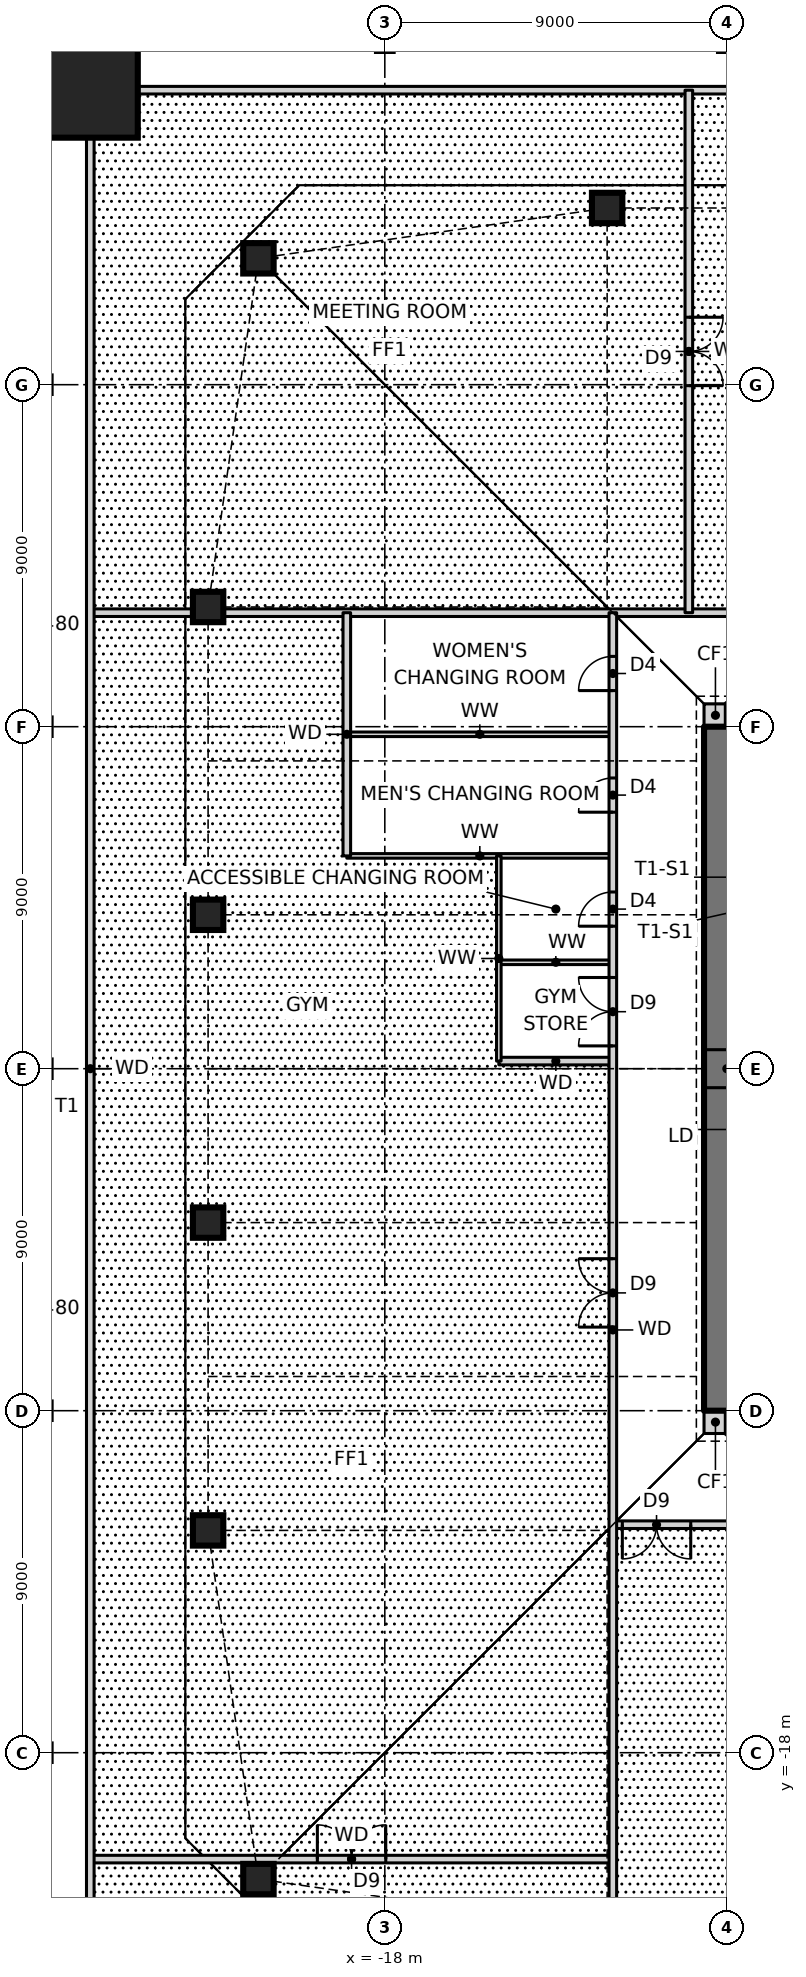
"""IFC4 building model, lengths in metres.
Left out: names, types, materials, properties, quantities, classifications, styles, units other than length and angle.
Written with IfcOpenShell. Run it as: python <this file> out.ifc"""

import sys

from ifc_helpers import new_model, si_unit, direction, frame, frame_2d, origin, origin_2d, place, context, subcontext, project, spatial, rectangle, hollow_rectangle, i_section, extrude, element, fill, save


model = new_model("IFC4")
c1 = context("Model", 3, precision=1e-05, world=origin(), true_north=direction((0.0, 1.0)))
c2 = subcontext(c1, "Body", "Model", "MODEL_VIEW")
j1 = project(units=[si_unit("LENGTHUNIT", "METRE"), si_unit("PLANEANGLEUNIT", "RADIAN")], contexts=[c1])
p1 = place(None, origin())
s1 = spatial("IfcSite", under=j1, at=p1, CompositionType="ELEMENT")
p2 = place(p1, origin())
s2 = spatial("IfcBuilding", under=s1, at=p2, CompositionType="ELEMENT")
p3 = place(p2, frame((0.0, 0.0, 6.0)))
s3 = spatial("IfcBuildingStorey", under=s2, at=p3, CompositionType="ELEMENT", Elevation=6.0)
for number, where, z_axis, x_axis in (
    (1, (-21.326, -21.326, 0.0), (0.0, 0.0, 1.0), (1.0, 0.0, 0.0)),
    (2, (-12.15, 22.65, 0.0), (0.0, 0.0, 1.0), (1.0, 0.0, 0.0)),
    (3, (-21.326, 21.326, 0.0), (0.0, 0.0, 1.0), (1.0, 0.0, 0.0)),
    (4, (-22.65, 12.15, 0.0), (0.0, 0.0, 1.0), (1.0, 0.0, 0.0)),
    (5, (-22.65, 4.05, 0.0), (0.0, 0.0, 1.0), (1.0, 0.0, 0.0)),
    (6, (-22.65, -4.05, 0.0), (0.0, 0.0, 1.0), (1.0, 0.0, 0.0)),
    (7, (-22.65, -12.15, 0.0), (0.0, 0.0, 1.0), (1.0, 0.0, 0.0)),
):
    element("IfcColumn", number, at=place(p3, frame(where, z_axis=z_axis, x_axis=x_axis)), inside=s3, PredefinedType="COLUMN", context=c2, shape_type="SweptSolid", body=[
        extrude(hollow_rectangle(XDim=0.8, YDim=0.8, WallThickness=0.09, at=origin_2d()), origin(), (0.0, 0.0, 1.0), 4.5),
    ])
p4 = place(p3, frame((-27.0, 27.0, 0.0), z_axis=(0.0, 0.0, 1.0), x_axis=(1.0, 0.0, 0.0)))
e8 = element("IfcColumn", 8, at=p4, inside=s3, PredefinedType="COLUMN", context=c2, shape_type="SweptSolid", body=[
    extrude(rectangle(XDim=5.0, YDim=5.0, at=origin_2d()), origin(), (0.0, 0.0, 1.0), 4.5),
    extrude(i_section(OverallWidth=0.478, OverallDepth=0.599, WebThickness=0.1, FlangeThickness=0.14, at=origin_2d()), origin(), (0.0, 0.0, 1.0), 4.5),
])
for number, where, z_axis, x_axis in (
    (9, (-9.6, -9.3, 0.0), (0.0, 0.0, 1.0), (1.0, 0.0, 0.0)),
    (10, (-9.6, 9.3, 0.0), (0.0, 0.0, 1.0), (1.0, 0.0, 0.0)),
):
    element("IfcWall", number, at=place(p3, frame(where, z_axis=z_axis, x_axis=x_axis)), inside=s3, PredefinedType="SOLIDWALL", context=c2, shape_type="SweptSolid", body=[
        extrude(rectangle(XDim=0.6, YDim=0.6, at=frame_2d((0.3, 0.0))), origin(), (0.0, 0.0, 1.0), 4.5),
    ])
p5 = place(p3, frame((-9.0, 9.0, 0.0), z_axis=(0.0, 0.0, 1.0), x_axis=(0.0, -1.0, 0.0)))
e11 = element("IfcWall", 11, at=p5, inside=s3, PredefinedType="SHEAR", context=c2, shape_type="SweptSolid", body=[
    extrude(rectangle(XDim=18.0, YDim=1.2, at=frame_2d((9.0, 0.0))), origin(), (0.0, 0.0, 1.0), 4.5),
])
p6 = place(p5, frame((8.5, 0.0, 0.0)))
e12 = element("IfcOpeningElement", 12, at=p6, cuts=e11, PredefinedType="OPENING", context=c2, shape_type="SweptSolid", body=[
    extrude(rectangle(XDim=1.0, YDim=2.1, at=frame_2d((0.5, 1.05))), frame((0.0, 0.61, 0.0), z_axis=(0.0, -1.0, 0.0), x_axis=(1.0, 0.0, 0.0)), (0.0, 0.0, 1.0), 1.22),
])
p7 = place(p3, frame((-25.75, -20.8, 0.0), z_axis=(0.0, 0.0, 1.0), x_axis=(1.0, 0.0, 0.0)))
e13 = element("IfcWall", 13, at=p7, inside=s3, PredefinedType="SOLIDWALL", context=c2, shape_type="SweptSolid", body=[
    extrude(rectangle(XDim=13.75, YDim=0.2, at=frame_2d((6.875, 0.0))), origin(), (0.0, 0.0, 1.0), 4.25),
])
p8 = place(p7, frame((5.975, 0.0, 0.0)))
e14 = element("IfcOpeningElement", 14, at=p8, cuts=e13, PredefinedType="OPENING", context=c2, shape_type="SweptSolid", body=[
    extrude(rectangle(XDim=1.8, YDim=2.1, at=frame_2d((0.9, 1.05))), frame((0.0, 0.11, 0.0), z_axis=(0.0, -1.0, 0.0), x_axis=(1.0, 0.0, 0.0)), (0.0, 0.0, 1.0), 0.22),
])
p9 = place(p3, frame((-12.0, -12.0, 0.0), z_axis=(0.0, 0.0, 1.0), x_axis=(1.0, 0.0, 0.0)))
e15 = element("IfcWall", 15, at=p9, inside=s3, PredefinedType="SOLIDWALL", context=c2, shape_type="SweptSolid", body=[
    extrude(rectangle(XDim=37.75, YDim=0.2, at=frame_2d((18.875, 0.0))), origin(), (0.0, 0.0, 1.0), 4.25),
])
p10 = place(p9, frame((10.1, 0.0, 0.0)))
e16 = element("IfcOpeningElement", 16, at=p10, cuts=e15, PredefinedType="OPENING", context=c2, shape_type="SweptSolid", body=[
    extrude(rectangle(XDim=1.8, YDim=2.1, at=frame_2d((0.9, 1.05))), frame((0.0, 0.11, 0.0), z_axis=(0.0, -1.0, 0.0), x_axis=(1.0, 0.0, 0.0)), (0.0, 0.0, 1.0), 0.22),
])
p11 = place(p9, frame((0.25, 0.0, 0.0)))
e17 = element("IfcOpeningElement", 17, at=p11, cuts=e15, PredefinedType="OPENING", context=c2, shape_type="SweptSolid", body=[
    extrude(rectangle(XDim=1.8, YDim=2.1, at=frame_2d((0.9, 1.05))), frame((0.0, 0.11, 0.0), z_axis=(0.0, -1.0, 0.0), x_axis=(1.0, 0.0, 0.0)), (0.0, 0.0, 1.0), 0.22),
])
p12 = place(p3, frame((-15.0, 0.2, 0.0), z_axis=(0.0, 0.0, 1.0), x_axis=(1.0, 0.0, 0.0)))
e18 = element("IfcWall", 18, at=p12, inside=s3, PredefinedType="SOLIDWALL", context=c2, shape_type="SweptSolid", body=[
    extrude(rectangle(XDim=3.0, YDim=0.2, at=frame_2d((1.5, 0.0))), origin(), (0.0, 0.0, 1.0), 4.25),
])
p13 = place(p3, frame((-15.0, 2.8, 0.0), z_axis=(0.0, 0.0, 1.0), x_axis=(1.0, 0.0, 0.0)))
e19 = element("IfcWall", 19, at=p13, inside=s3, PredefinedType="PARTITIONING", context=c2, shape_type="SweptSolid", body=[
    extrude(rectangle(XDim=3.0, YDim=0.12, at=frame_2d((1.5, 0.0))), origin(), (0.0, 0.0, 1.0), 4.25),
])
for number, where, z_axis, x_axis in (
    (20, (-19.0, 5.6, 0.0), (0.0, 0.0, 1.0), (1.0, 0.0, 0.0)),
    (21, (-19.0, 8.8, 0.0), (0.0, 0.0, 1.0), (1.0, 0.0, 0.0)),
):
    element("IfcWall", number, at=place(p3, frame(where, z_axis=z_axis, x_axis=x_axis)), inside=s3, PredefinedType="PARTITIONING", context=c2, shape_type="SweptSolid", body=[
        extrude(rectangle(XDim=7.0, YDim=0.12, at=frame_2d((3.5, 0.0))), origin(), (0.0, 0.0, 1.0), 4.25),
    ])
p14 = place(p3, frame((-25.75, 12.0, 0.0), z_axis=(0.0, 0.0, 1.0), x_axis=(1.0, 0.0, 0.0)))
e22 = element("IfcWall", 22, at=p14, inside=s3, PredefinedType="SOLIDWALL", context=c2, shape_type="SweptSolid", body=[
    extrude(rectangle(XDim=37.75, YDim=0.2, at=frame_2d((18.875, 0.0))), origin(), (0.0, 0.0, 1.0), 4.25),
])
p15 = place(p14, frame((25.85, 0.0, 0.0)))
e23 = element("IfcOpeningElement", 23, at=p15, cuts=e22, PredefinedType="OPENING", context=c2, shape_type="SweptSolid", body=[
    extrude(rectangle(XDim=1.8, YDim=2.1, at=frame_2d((0.9, 1.05))), frame((0.0, 0.11, 0.0), z_axis=(0.0, -1.0, 0.0), x_axis=(1.0, 0.0, 0.0)), (0.0, 0.0, 1.0), 0.22),
])
p16 = place(p3, frame((-25.75, 25.75, 0.0), z_axis=(0.0, 0.0, 1.0), x_axis=(1.0, 0.0, 0.0)))
e24 = element("IfcWall", 24, at=p16, inside=s3, PredefinedType="SOLIDWALL", context=c2, shape_type="SweptSolid", body=[
    extrude(rectangle(XDim=51.5, YDim=0.2, at=frame_2d((25.75, 0.0))), origin(), (0.0, 0.0, 1.0), 4.25),
])
p17 = place(p3, frame((-10.0, 12.0, 0.0), z_axis=(0.0, 0.0, 1.0), x_axis=(0.0, 1.0, 0.0)))
e25 = element("IfcWall", 25, at=p17, inside=s3, PredefinedType="SOLIDWALL", context=c2, shape_type="SweptSolid", body=[
    extrude(rectangle(XDim=13.75, YDim=0.2, at=frame_2d((6.875, 0.0))), origin(), (0.0, 0.0, 1.0), 4.25),
])
p18 = place(p17, frame((5.975, 0.0, 0.0)))
e26 = element("IfcOpeningElement", 26, at=p18, cuts=e25, PredefinedType="OPENING", context=c2, shape_type="SweptSolid", body=[
    extrude(rectangle(XDim=1.8, YDim=2.1, at=frame_2d((0.9, 1.05))), frame((0.0, 0.11, 0.0), z_axis=(0.0, -1.0, 0.0), x_axis=(1.0, 0.0, 0.0)), (0.0, 0.0, 1.0), 0.22),
])
p19 = place(p3, frame((-12.0, -25.75, 0.0), z_axis=(0.0, 0.0, 1.0), x_axis=(0.0, 1.0, 0.0)))
e27 = element("IfcWall", 27, at=p19, inside=s3, PredefinedType="SOLIDWALL", context=c2, shape_type="SweptSolid", body=[
    extrude(rectangle(XDim=37.75, YDim=0.2, at=frame_2d((18.875, 0.0))), origin(), (0.0, 0.0, 1.0), 4.25),
])
p20 = place(p19, frame((35.7, 0.0, 0.0)))
e28 = element("IfcOpeningElement", 28, at=p20, cuts=e27, PredefinedType="OPENING", context=c2, shape_type="SweptSolid", body=[
    extrude(rectangle(XDim=0.9, YDim=2.1, at=frame_2d((0.45, 1.05))), frame((0.0, 0.11, 0.0), z_axis=(0.0, -1.0, 0.0), x_axis=(1.0, 0.0, 0.0)), (0.0, 0.0, 1.0), 0.22),
])
p21 = place(p19, frame((32.5, 0.0, 0.0)))
e29 = element("IfcOpeningElement", 29, at=p21, cuts=e27, PredefinedType="OPENING", context=c2, shape_type="SweptSolid", body=[
    extrude(rectangle(XDim=0.9, YDim=2.1, at=frame_2d((0.45, 1.05))), frame((0.0, 0.11, 0.0), z_axis=(0.0, -1.0, 0.0), x_axis=(1.0, 0.0, 0.0)), (0.0, 0.0, 1.0), 0.22),
])
p22 = place(p19, frame((29.5, 0.0, 0.0)))
e30 = element("IfcOpeningElement", 30, at=p22, cuts=e27, PredefinedType="OPENING", context=c2, shape_type="SweptSolid", body=[
    extrude(rectangle(XDim=0.9, YDim=2.1, at=frame_2d((0.45, 1.05))), frame((0.0, 0.11, 0.0), z_axis=(0.0, -1.0, 0.0), x_axis=(1.0, 0.0, 0.0)), (0.0, 0.0, 1.0), 0.22),
])
p23 = place(p19, frame((26.35, 0.0, 0.0)))
e31 = element("IfcOpeningElement", 31, at=p23, cuts=e27, PredefinedType="OPENING", context=c2, shape_type="SweptSolid", body=[
    extrude(rectangle(XDim=1.8, YDim=2.1, at=frame_2d((0.9, 1.05))), frame((0.0, 0.11, 0.0), z_axis=(0.0, -1.0, 0.0), x_axis=(1.0, 0.0, 0.0)), (0.0, 0.0, 1.0), 0.22),
])
p24 = place(p19, frame((18.95, 0.0, 0.0)))
e32 = element("IfcOpeningElement", 32, at=p24, cuts=e27, PredefinedType="OPENING", context=c2, shape_type="SweptSolid", body=[
    extrude(rectangle(XDim=1.8, YDim=2.1, at=frame_2d((0.9, 1.05))), frame((0.0, 0.11, 0.0), z_axis=(0.0, -1.0, 0.0), x_axis=(1.0, 0.0, 0.0)), (0.0, 0.0, 1.0), 0.22),
])
p25 = place(p3, frame((-15.0, 0.2, 0.0), z_axis=(0.0, 0.0, 1.0), x_axis=(0.0, 1.0, 0.0)))
e33 = element("IfcWall", 33, at=p25, inside=s3, PredefinedType="PARTITIONING", context=c2, shape_type="SweptSolid", body=[
    extrude(rectangle(XDim=5.4, YDim=0.12, at=frame_2d((2.7, 0.0))), origin(), (0.0, 0.0, 1.0), 4.25),
])
p26 = place(p3, frame((-19.0, 5.6, 0.0), z_axis=(0.0, 0.0, 1.0), x_axis=(0.0, 1.0, 0.0)))
e34 = element("IfcWall", 34, at=p26, inside=s3, PredefinedType="SOLIDWALL", context=c2, shape_type="SweptSolid", body=[
    extrude(rectangle(XDim=6.4, YDim=0.2, at=frame_2d((3.2, 0.0))), origin(), (0.0, 0.0, 1.0), 4.25),
])
p27 = place(p3, frame((-25.75, -25.75, 0.0), z_axis=(0.0, 0.0, 1.0), x_axis=(0.0, 1.0, 0.0)))
e35 = element("IfcWall", 35, at=p27, inside=s3, PredefinedType="SOLIDWALL", context=c2, shape_type="SweptSolid", body=[
    extrude(rectangle(XDim=51.5, YDim=0.2, at=frame_2d((25.75, 0.0))), origin(), (0.0, 0.0, 1.0), 4.25),
])
p28 = place(p11, frame((1.8, 0.0, 0.0), z_axis=(0.0, 0.0, 1.0), x_axis=(-1.0, 0.0, 0.0)))
e36 = element("IfcDoor", 36, at=p28, inside=s3, OperationType="DOUBLE_DOOR_SINGLE_SWING", PredefinedType="DOOR", context=c2, shape_type="SweptSolid", body=[
    extrude(rectangle(XDim=1.8, YDim=2.1, at=frame_2d((0.9, 1.05))), frame((0.0, 0.025, 0.0), z_axis=(0.0, -1.0, 0.0), x_axis=(1.0, 0.0, 0.0)), (0.0, 0.0, 1.0), 0.05),
])
fill(e17, e36)
p29 = place(p18, frame((1.8, 0.0, 0.0), z_axis=(0.0, 0.0, 1.0), x_axis=(-1.0, 0.0, 0.0)))
e37 = element("IfcDoor", 37, at=p29, inside=s3, OperationType="DOUBLE_DOOR_SINGLE_SWING", PredefinedType="DOOR", context=c2, shape_type="SweptSolid", body=[
    extrude(rectangle(XDim=1.8, YDim=2.1, at=frame_2d((0.9, 1.05))), frame((0.0, 0.025, 0.0), z_axis=(0.0, -1.0, 0.0), x_axis=(1.0, 0.0, 0.0)), (0.0, 0.0, 1.0), 0.05),
])
fill(e26, e37)
p30 = place(p20, origin())
e38 = element("IfcDoor", 38, at=p30, inside=s3, OperationType="SINGLE_SWING_LEFT", PredefinedType="DOOR", context=c2, shape_type="SweptSolid", body=[
    extrude(rectangle(XDim=0.9, YDim=2.1, at=frame_2d((0.45, 1.05))), frame((0.0, 0.025, 0.0), z_axis=(0.0, -1.0, 0.0), x_axis=(1.0, 0.0, 0.0)), (0.0, 0.0, 1.0), 0.05),
])
fill(e28, e38)
p31 = place(p21, origin())
e39 = element("IfcDoor", 39, at=p31, inside=s3, OperationType="SINGLE_SWING_LEFT", PredefinedType="DOOR", context=c2, shape_type="SweptSolid", body=[
    extrude(rectangle(XDim=0.9, YDim=2.1, at=frame_2d((0.45, 1.05))), frame((0.0, 0.025, 0.0), z_axis=(0.0, -1.0, 0.0), x_axis=(1.0, 0.0, 0.0)), (0.0, 0.0, 1.0), 0.05),
])
fill(e29, e39)
p32 = place(p22, origin())
e40 = element("IfcDoor", 40, at=p32, inside=s3, OperationType="SINGLE_SWING_LEFT", PredefinedType="DOOR", context=c2, shape_type="SweptSolid", body=[
    extrude(rectangle(XDim=0.9, YDim=2.1, at=frame_2d((0.45, 1.05))), frame((0.0, 0.025, 0.0), z_axis=(0.0, -1.0, 0.0), x_axis=(1.0, 0.0, 0.0)), (0.0, 0.0, 1.0), 0.05),
])
fill(e30, e40)
p33 = place(p23, origin())
e41 = element("IfcDoor", 41, at=p33, inside=s3, OperationType="DOUBLE_DOOR_SINGLE_SWING", PredefinedType="DOOR", context=c2, shape_type="SweptSolid", body=[
    extrude(rectangle(XDim=1.8, YDim=2.1, at=frame_2d((0.9, 1.05))), frame((0.0, 0.025, 0.0), z_axis=(0.0, -1.0, 0.0), x_axis=(1.0, 0.0, 0.0)), (0.0, 0.0, 1.0), 0.05),
])
fill(e31, e41)
p34 = place(p24, origin())
e42 = element("IfcDoor", 42, at=p34, inside=s3, OperationType="DOUBLE_DOOR_SINGLE_SWING", PredefinedType="DOOR", context=c2, shape_type="SweptSolid", body=[
    extrude(rectangle(XDim=1.8, YDim=2.1, at=frame_2d((0.9, 1.05))), frame((0.0, 0.025, 0.0), z_axis=(0.0, -1.0, 0.0), x_axis=(1.0, 0.0, 0.0)), (0.0, 0.0, 1.0), 0.05),
])
fill(e32, e42)
p35 = place(p8, origin())
e43 = element("IfcDoor", 43, at=p35, inside=s3, OperationType="DOUBLE_DOOR_SINGLE_SWING", PredefinedType="DOOR", context=c2, shape_type="SweptSolid", body=[
    extrude(rectangle(XDim=1.8, YDim=2.1, at=frame_2d((0.9, 1.05))), frame((0.0, 0.025, 0.0), z_axis=(0.0, -1.0, 0.0), x_axis=(1.0, 0.0, 0.0)), (0.0, 0.0, 1.0), 0.05),
])
fill(e14, e43)
p36 = place(p6, origin())
e44 = element("IfcDoor", 44, at=p36, inside=s3, OperationType="SINGLE_SWING_RIGHT", PredefinedType="DOOR", context=c2, shape_type="SweptSolid", body=[
    extrude(rectangle(XDim=1.0, YDim=2.1, at=frame_2d((0.5, 1.05))), frame((0.0, 0.025, 0.0), z_axis=(0.0, -1.0, 0.0), x_axis=(1.0, 0.0, 0.0)), (0.0, 0.0, 1.0), 0.05),
])
fill(e12, e44)
save(model, sys.argv[1])
